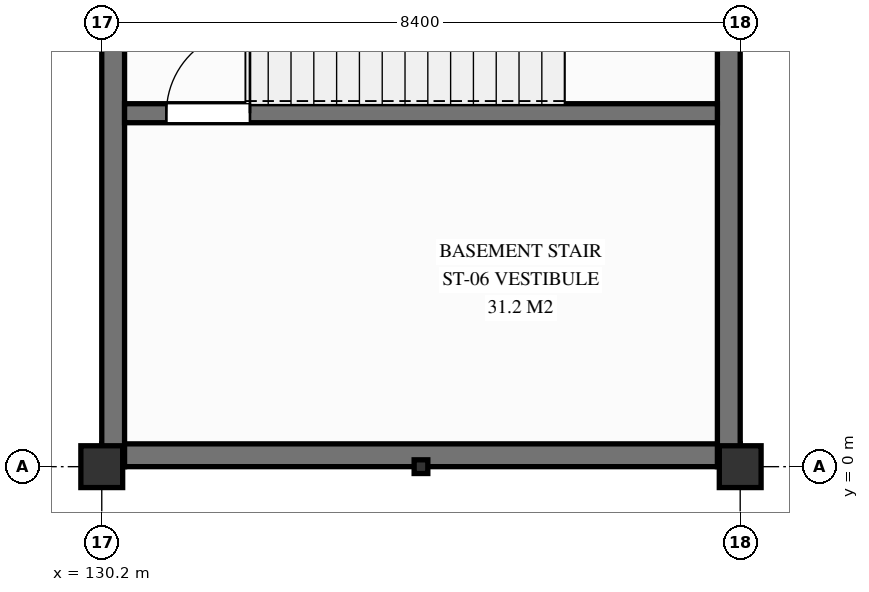
"""IFC4 building model, lengths in metres.
Left out: names, types, materials, properties, quantities, classifications, styles, units other than length and angle.
Written with IfcOpenShell. Run it as: python <this file> out.ifc"""

import sys

from ifc_helpers import new_model, si_unit, direction, frame, frame_2d, origin, origin_2d, place, context, subcontext, project, spatial, rectangle, hollow_rectangle, extrude, element, fill, save


model = new_model("IFC4")
c1 = context("Model", 3, precision=1e-05, world=origin(), true_north=direction((0.0, 1.0)))
c2 = subcontext(c1, "Body", "Model", "MODEL_VIEW")
j1 = project(units=[si_unit("LENGTHUNIT", "METRE"), si_unit("PLANEANGLEUNIT", "RADIAN")], contexts=[c1])
p1 = place(None, origin())
s1 = spatial("IfcSite", under=j1, at=p1, CompositionType="ELEMENT")
p2 = place(p1, origin())
s2 = spatial("IfcBuilding", under=s1, at=p2, CompositionType="ELEMENT")
p3 = place(p2, frame((0.0, 0.0, -4.5)))
s3 = spatial("IfcBuildingStorey", under=s2, at=p3, CompositionType="ELEMENT", Elevation=-4.5)
p4 = place(p3, frame((138.6, 0.15, 0.0), z_axis=(0.0, 0.0, 1.0), x_axis=(-1.0, 0.0, 0.0)))
e1 = element("IfcWall", 1, at=p4, inside=s3, PredefinedType="SHEAR", context=c2, shape_type="SweptSolid", body=[
    extrude(rectangle(XDim=8.4, YDim=0.3, at=frame_2d((4.2, 0.0))), origin(), (0.0, 0.0, 1.0), 4.5),
])
for number, where, z_axis, x_axis in (
    (2, (130.35, 0.0, 0.0), (0.0, 0.0, 1.0), (0.0, 1.0, 0.0)),
    (3, (138.45, 0.0, 0.0), (0.0, 0.0, 1.0), (0.0, 1.0, 0.0)),
):
    element("IfcWall", number, at=place(p3, frame(where, z_axis=z_axis, x_axis=x_axis)), inside=s3, PredefinedType="SHEAR", context=c2, shape_type="SweptSolid", body=[
        extrude(rectangle(XDim=8.4, YDim=0.3, at=frame_2d((4.2, 0.0))), origin(), (0.0, 0.0, 1.0), 4.5),
    ])
p5 = place(p3, frame((130.5, 4.65, 0.0), z_axis=(0.0, 0.0, 1.0), x_axis=(1.0, 0.0, 0.0)))
e4 = element("IfcWall", 4, at=p5, inside=s3, PredefinedType="SHEAR", context=c2, shape_type="SweptSolid", body=[
    extrude(rectangle(XDim=7.8, YDim=0.25, at=frame_2d((3.9, 0.0))), origin(), (0.0, 0.0, 1.0), 4.5),
])
p6 = place(p5, frame((0.55, 0.0, 0.0)))
e5 = element("IfcOpeningElement", 5, at=p6, cuts=e4, PredefinedType="OPENING", context=c2, shape_type="SweptSolid", body=[
    extrude(rectangle(XDim=1.1, YDim=2.15, at=frame_2d((0.55, 1.075))), frame((0.0, 0.135, 0.0), z_axis=(0.0, -1.0, 0.0), x_axis=(1.0, 0.0, 0.0)), (0.0, 0.0, 1.0), 0.27),
])
for number, where, z_axis, x_axis in (
    (6, (130.2, 0.0, 0.0), (0.0, 0.0, 1.0), (1.0, 0.0, 0.0)),
    (7, (138.6, 0.0, 0.0), (0.0, 0.0, 1.0), (1.0, 0.0, 0.0)),
):
    element("IfcColumn", number, at=place(p3, frame(where, z_axis=z_axis, x_axis=x_axis)), inside=s3, PredefinedType="COLUMN", context=c2, shape_type="SweptSolid", body=[
        extrude(rectangle(XDim=0.55, YDim=0.55, at=origin_2d()), origin(), (0.0, 0.0, 1.0), 4.5),
    ])
p7 = place(p3, frame((134.4, 0.0, 0.0), z_axis=(0.0, 0.0, 1.0), x_axis=(1.0, 0.0, 0.0)))
e8 = element("IfcColumn", 8, at=p7, inside=s3, PredefinedType="PILASTER", context=c2, shape_type="SweptSolid", body=[
    extrude(hollow_rectangle(XDim=0.18, YDim=0.18, WallThickness=0.01, InnerFilletRadius=0.015, OuterFilletRadius=0.025, at=origin_2d()), origin(), (0.0, 0.0, 1.0), 4.5),
])
p8 = place(p6, origin())
e9 = element("IfcDoor", 9, at=p8, inside=s3, OperationType="SINGLE_SWING_RIGHT", PredefinedType="DOOR", context=c2, shape_type="SweptSolid", body=[
    extrude(rectangle(XDim=1.1, YDim=2.15, at=frame_2d((0.55, 1.075))), frame((0.0, 0.025, 0.0), z_axis=(0.0, -1.0, 0.0), x_axis=(1.0, 0.0, 0.0)), (0.0, 0.0, 1.0), 0.05),
])
fill(e5, e9)
save(model, sys.argv[1])
